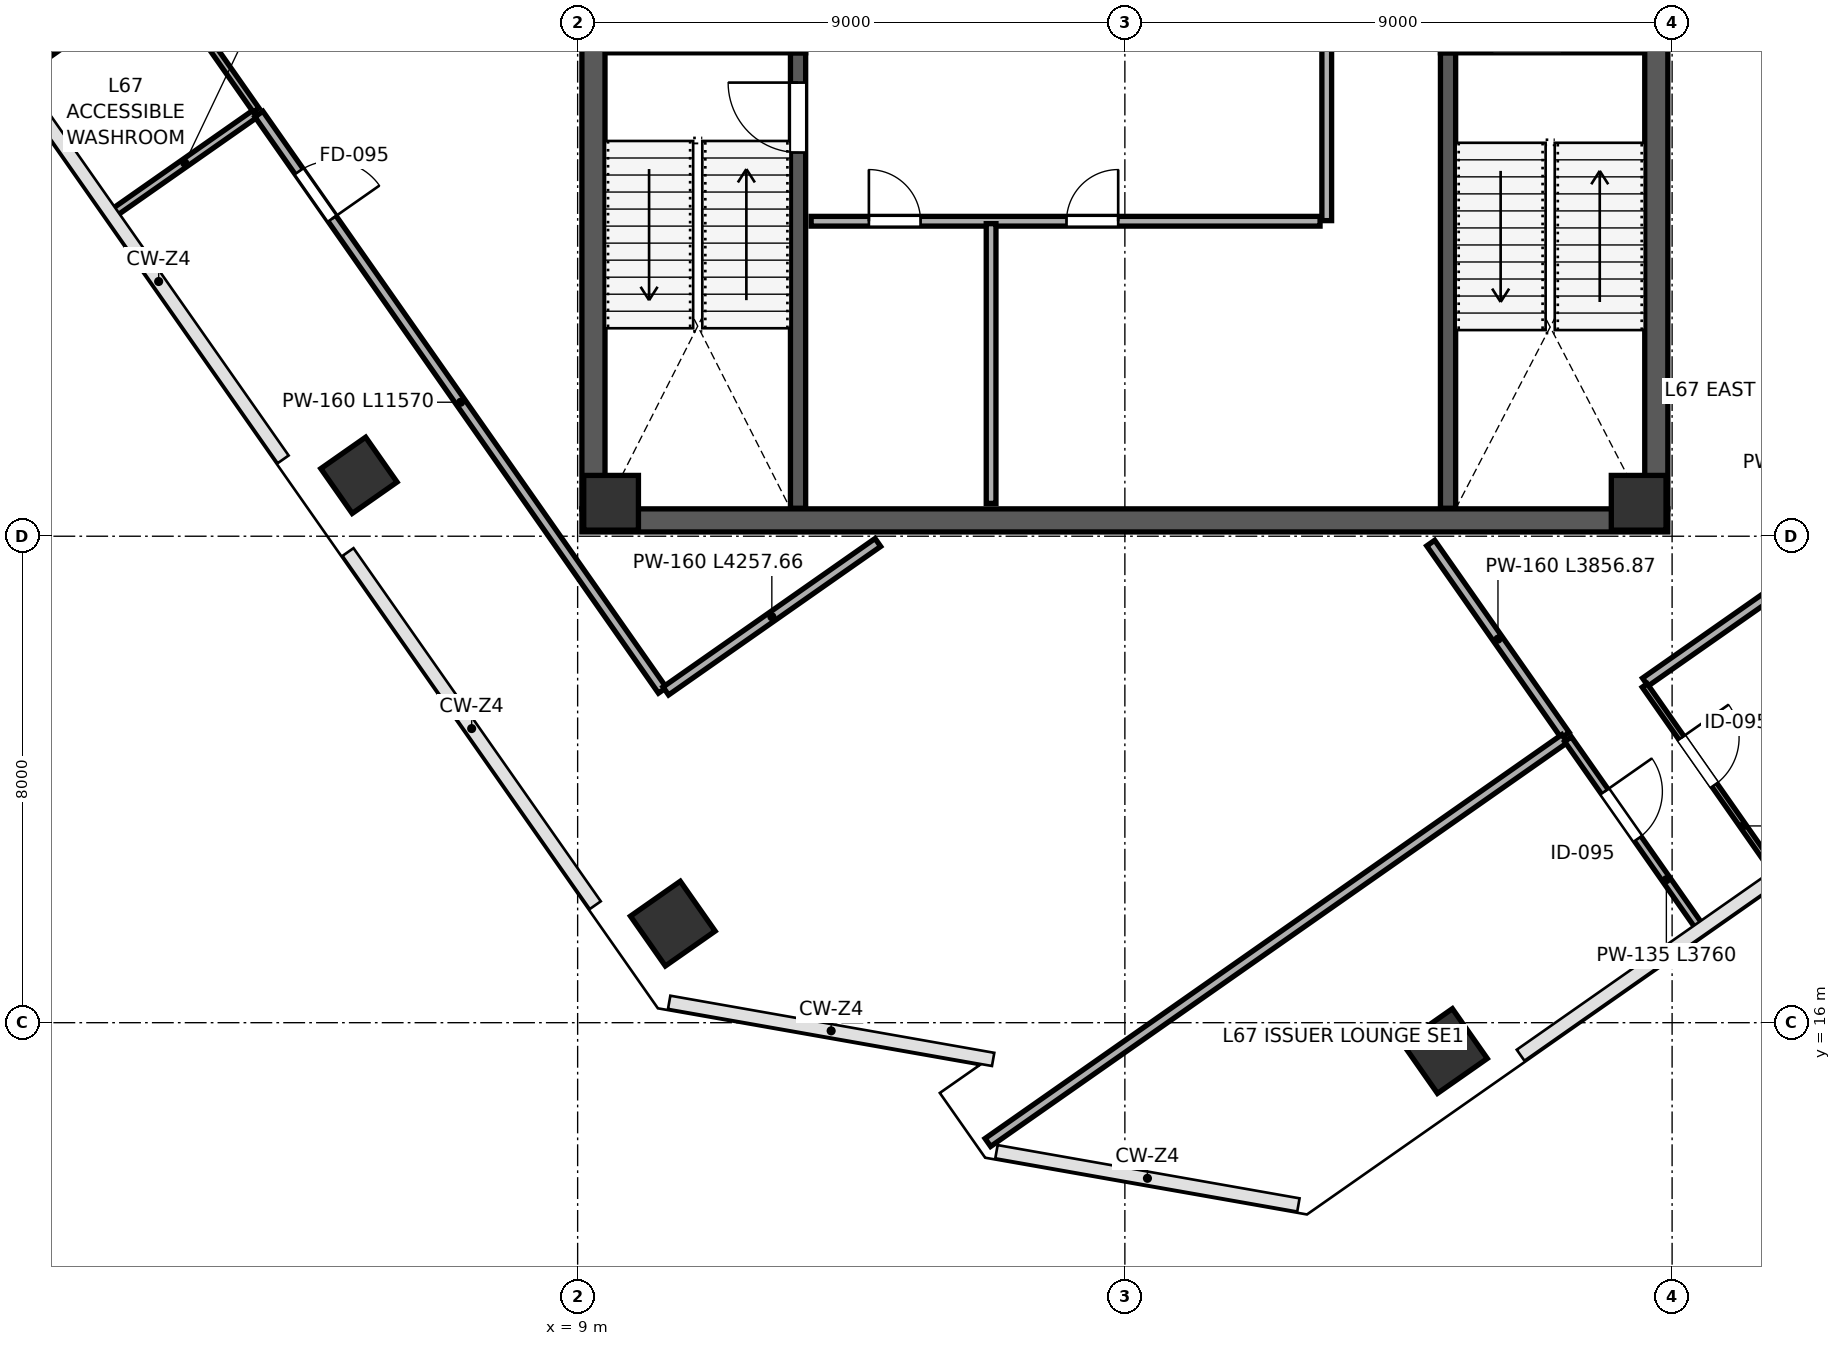
"""IFC4 building model, lengths in metres.
Left out: names, types, materials, properties, quantities, classifications, styles, units other than length and angle.
Written with IfcOpenShell. Run it as: python <this file> out.ifc"""

import sys

from ifc_helpers import new_model, si_unit, direction, frame, frame_2d, origin, origin_2d, place, context, subcontext, project, spatial, rectangle, extrude, source, transform, mapped, element, fill, save


model = new_model("IFC4")
c1 = context("Model", 3, precision=1e-05, world=origin(), true_north=direction((0.0, 1.0)))
c2 = subcontext(c1, "Body", "Model", "MODEL_VIEW")
j1 = project(units=[si_unit("LENGTHUNIT", "METRE"), si_unit("PLANEANGLEUNIT", "RADIAN")], contexts=[c1])
p1 = place(None, origin())
s1 = spatial("IfcSite", under=j1, at=p1, CompositionType="ELEMENT")
p2 = place(p1, origin())
s2 = spatial("IfcBuilding", under=s1, at=p2, CompositionType="ELEMENT")
p3 = place(p2, frame((0.0, 0.0, 298.8)))
s3 = spatial("IfcBuildingStorey", under=s2, at=p3, CompositionType="ELEMENT", Elevation=298.8)
m1 = source(origin(), c2, "Body", "SweptSolid", [
    extrude(rectangle(XDim=0.9, YDim=0.9, at=origin_2d()), origin(), (0.0, 0.0, 1.0), 4.198),
])
for number, where, z_axis, x_axis in (
    (1, (9.55, 24.55, 0.001), (0.0, 0.0, 1.0), (1.0, 0.0, 0.0)),
    (2, (26.45, 24.55, 0.001), (0.0, 0.0, 1.0), (1.0, 0.0, 0.0)),
):
    element("IfcColumn", number, at=place(p3, frame(where, z_axis=z_axis, x_axis=x_axis)), inside=s3, PredefinedType="COLUMN", context=c2, shape_type="MappedRepresentation", body=[
        mapped(m1, transform((0.0, 0.0, 0.0), scale=1.0)),
    ])
m2 = source(origin(), c2, "Body", "SweptSolid", [
    extrude(rectangle(XDim=0.9, YDim=0.9, at=origin_2d()), origin(), (0.0, 0.0, 1.0), 4.198),
])
for number, where, z_axis, x_axis in (
    (3, (0.241, 32.374, 0.001), (0.0, 0.0, 1.0), (-0.574, 0.819, 0.0)),
    (4, (5.403, 25.001, 0.001), (0.0, 0.0, 1.0), (-0.574, 0.819, 0.0)),
):
    element("IfcColumn", number, at=place(p3, frame(where, z_axis=z_axis, x_axis=x_axis)), inside=s3, PredefinedType="COLUMN", context=c2, shape_type="MappedRepresentation", body=[
        mapped(m2, transform((0.0, 0.0, 0.0), scale=1.0)),
    ])
m3 = source(origin(), c2, "Body", "SweptSolid", [
    extrude(rectangle(XDim=1.0, YDim=1.0, at=origin_2d()), origin(), (0.0, 0.0, 1.0), 4.198),
])
for number, where, z_axis, x_axis in (
    (5, (10.565, 17.629, 0.001), (0.0, 0.0, 1.0), (-0.574, 0.819, 0.0)),
    (6, (23.264, 15.534, 0.001), (0.0, 0.0, 1.0), (-0.574, 0.819, 0.0)),
):
    element("IfcColumn", number, at=place(p3, frame(where, z_axis=z_axis, x_axis=x_axis)), inside=s3, PredefinedType="COLUMN", context=c2, shape_type="MappedRepresentation", body=[
        mapped(m3, transform((0.0, 0.0, 0.0), scale=1.0)),
    ])
p4 = place(p3, frame((9.26, 24.45, 0.0), z_axis=(0.0, 0.0, 1.0), x_axis=(0.0, 1.0, 0.0)))
e7 = element("IfcWall", 7, at=p4, inside=s3, PredefinedType="SHEAR", context=c2, shape_type="SweptSolid", body=[
    extrude(rectangle(XDim=15.1, YDim=0.38, at=frame_2d((7.55, 0.0))), origin(), (0.0, 0.0, 1.0), 3.96),
])
p5 = place(p4, frame((8.7, 0.0, 0.0)))
e8 = element("IfcOpeningElement", 8, at=p5, cuts=e7, PredefinedType="OPENING", context=c2, shape_type="SweptSolid", body=[
    extrude(rectangle(XDim=1.15, YDim=2.2, at=frame_2d((0.575, 1.1))), frame((0.0, 0.2, 0.0), z_axis=(0.0, -1.0, 0.0), x_axis=(1.0, 0.0, 0.0)), (0.0, 0.0, 1.0), 0.4),
])
p6 = place(p3, frame((26.74, 24.45, 0.0), z_axis=(0.0, 0.0, 1.0), x_axis=(0.0, 1.0, 0.0)))
e9 = element("IfcWall", 9, at=p6, inside=s3, PredefinedType="SHEAR", context=c2, shape_type="SweptSolid", body=[
    extrude(rectangle(XDim=15.1, YDim=0.38, at=frame_2d((7.55, 0.0))), origin(), (0.0, 0.0, 1.0), 3.96),
])
p7 = place(p6, frame((8.6, 0.0, 0.0)))
e10 = element("IfcOpeningElement", 10, at=p7, cuts=e9, PredefinedType="OPENING", context=c2, shape_type="SweptSolid", body=[
    extrude(rectangle(XDim=1.15, YDim=2.2, at=frame_2d((0.575, 1.1))), frame((0.0, 0.2, 0.0), z_axis=(0.0, -1.0, 0.0), x_axis=(1.0, 0.0, 0.0)), (0.0, 0.0, 1.0), 0.4),
])
p8 = place(p3, frame((9.07, 24.26, 0.0), z_axis=(0.0, 0.0, 1.0), x_axis=(1.0, 0.0, 0.0)))
e11 = element("IfcWall", 11, at=p8, inside=s3, PredefinedType="SHEAR", context=c2, shape_type="SweptSolid", body=[
    extrude(rectangle(XDim=17.86, YDim=0.38, at=frame_2d((8.93, 0.0))), origin(), (0.0, 0.0, 1.0), 3.96),
])
p9 = place(p3, frame((12.625, 24.46, 0.0), z_axis=(0.0, 0.0, 1.0), x_axis=(0.0, 1.0, 0.0)))
e12 = element("IfcWall", 12, at=p9, inside=s3, PredefinedType="SHEAR", context=c2, shape_type="SweptSolid", body=[
    extrude(rectangle(XDim=7.49, YDim=0.25, at=frame_2d((3.745, 0.0))), origin(), (0.0, 0.0, 1.0), 3.96),
])
p10 = place(p9, frame((5.85, 0.0, 0.0)))
e13 = element("IfcOpeningElement", 13, at=p10, cuts=e12, PredefinedType="OPENING", context=c2, shape_type="SweptSolid", body=[
    extrude(rectangle(XDim=1.15, YDim=2.2, at=frame_2d((0.575, 1.1))), frame((0.0, 0.135, 0.0), z_axis=(0.0, -1.0, 0.0), x_axis=(1.0, 0.0, 0.0)), (0.0, 0.0, 1.0), 0.27),
])
p11 = place(p3, frame((9.46, 32.075, 0.0), z_axis=(0.0, 0.0, 1.0), x_axis=(1.0, 0.0, 0.0)))
e14 = element("IfcWall", 14, at=p11, inside=s3, PredefinedType="SHEAR", context=c2, shape_type="SweptSolid", body=[
    extrude(rectangle(XDim=3.29, YDim=0.25, at=frame_2d((1.645, 0.0))), origin(), (0.0, 0.0, 1.0), 3.96),
])
p12 = place(p3, frame((23.315, 24.46, 0.0), z_axis=(0.0, 0.0, 1.0), x_axis=(0.0, 1.0, 0.0)))
e15 = element("IfcWall", 15, at=p12, inside=s3, PredefinedType="SHEAR", context=c2, shape_type="SweptSolid", body=[
    extrude(rectangle(XDim=7.49, YDim=0.25, at=frame_2d((3.745, 0.0))), origin(), (0.0, 0.0, 1.0), 3.96),
])
p13 = place(p3, frame((23.19, 32.075, 0.0), z_axis=(0.0, 0.0, 1.0), x_axis=(1.0, 0.0, 0.0)))
e16 = element("IfcWall", 16, at=p13, inside=s3, PredefinedType="SHEAR", context=c2, shape_type="SweptSolid", body=[
    extrude(rectangle(XDim=3.35, YDim=0.25, at=frame_2d((1.675, 0.0))), origin(), (0.0, 0.0, 1.0), 3.96),
])
p14 = place(p13, frame((0.85, 0.0, 0.0)))
e17 = element("IfcOpeningElement", 17, at=p14, cuts=e16, PredefinedType="OPENING", context=c2, shape_type="SweptSolid", body=[
    extrude(rectangle(XDim=1.15, YDim=2.2, at=frame_2d((0.575, 1.1))), frame((0.0, 0.135, 0.0), z_axis=(0.0, -1.0, 0.0), x_axis=(1.0, 0.0, 0.0)), (0.0, 0.0, 1.0), 0.27),
])
p15 = place(p3, frame((12.84, 29.18, 0.0), z_axis=(0.0, 0.0, 1.0), x_axis=(1.0, 0.0, 0.0)))
e18 = element("IfcWall", 18, at=p15, inside=s3, PredefinedType="PARTITIONING", context=c2, shape_type="SweptSolid", body=[
    extrude(rectangle(XDim=8.37, YDim=0.16, at=frame_2d((4.185, 0.0))), origin(), (0.0, 0.0, 1.0), 3.96),
])
p16 = place(p15, frame((0.95, 0.0, 0.0)))
e19 = element("IfcOpeningElement", 19, at=p16, cuts=e18, PredefinedType="OPENING", context=c2, shape_type="SweptSolid", body=[
    extrude(rectangle(XDim=0.85, YDim=2.1, at=frame_2d((0.425, 1.05))), frame((0.0, 0.09, 0.0), z_axis=(0.0, -1.0, 0.0), x_axis=(1.0, 0.0, 0.0)), (0.0, 0.0, 1.0), 0.18),
])
p17 = place(p15, frame((4.2, 0.0, 0.0)))
e20 = element("IfcOpeningElement", 20, at=p17, cuts=e18, PredefinedType="OPENING", context=c2, shape_type="SweptSolid", body=[
    extrude(rectangle(XDim=0.85, YDim=2.1, at=frame_2d((0.425, 1.05))), frame((0.0, 0.09, 0.0), z_axis=(0.0, -1.0, 0.0), x_axis=(1.0, 0.0, 0.0)), (0.0, 0.0, 1.0), 0.18),
])
p18 = place(p3, frame((15.8, 24.54, 0.0), z_axis=(0.0, 0.0, 1.0), x_axis=(0.0, 1.0, 0.0)))
e21 = element("IfcWall", 21, at=p18, inside=s3, PredefinedType="PARTITIONING", context=c2, shape_type="SweptSolid", body=[
    extrude(rectangle(XDim=4.6, YDim=0.16, at=frame_2d((2.3, 0.0))), origin(), (0.0, 0.0, 1.0), 3.96),
])
p19 = place(p3, frame((21.32, 29.19, 0.0), z_axis=(0.0, 0.0, 1.0), x_axis=(0.0, 1.0, 0.0)))
e22 = element("IfcWall", 22, at=p19, inside=s3, PredefinedType="PARTITIONING", context=c2, shape_type="SweptSolid", body=[
    extrude(rectangle(XDim=2.92, YDim=0.16, at=frame_2d((1.46, 0.0))), origin(), (0.0, 0.0, 1.0), 3.96),
])
p20 = place(p3, frame((-0.431, 31.904, 0.0), z_axis=(0.0, 0.0, 1.0), x_axis=(0.819122867865, 0.573618102347, 0.0)))
e23 = element("IfcWall", 23, at=p20, inside=s3, PredefinedType="PARTITIONING", context=c2, shape_type="SweptSolid", body=[
    extrude(rectangle(XDim=2.84, YDim=0.1, at=frame_2d((1.42, 0.0))), origin(), (0.0, 0.0, 1.0), 3.295),
])
p21 = place(p3, frame((1.376, 29.323, 0.0), z_axis=(0.0, 0.0, 1.0), x_axis=(0.819163257805, 0.573560421458, 0.0)))
e24 = element("IfcWall", 24, at=p21, inside=s3, PredefinedType="PARTITIONING", context=c2, shape_type="SweptSolid", body=[
    extrude(rectangle(XDim=2.84, YDim=0.135, at=frame_2d((1.42, 0.0))), origin(), (0.0, 0.0, 1.0), 3.295),
])
p22 = place(p3, frame((-0.544, 37.086, 0.0), z_axis=(0.0, 0.0, 1.0), x_axis=(0.573568336404, -0.819157715873, 0.0)))
e25 = element("IfcWall", 25, at=p22, inside=s3, PredefinedType="PARTITIONING", context=c2, shape_type="SweptSolid", body=[
    extrude(rectangle(XDim=7.42, YDim=0.115, at=frame_2d((3.71, 0.0))), origin(), (0.0, 0.0, 1.0), 3.96),
])
p23 = place(p22, frame((2.9, 0.0, 0.0)))
e26 = element("IfcOpeningElement", 26, at=p23, cuts=e25, PredefinedType="OPENING", context=c2, shape_type="SweptSolid", body=[
    extrude(rectangle(XDim=0.9, YDim=2.15, at=frame_2d((0.45, 1.075))), frame((0.0, 0.067, 0.0), z_axis=(0.0, -1.0, 0.0), x_axis=(1.0, 0.0, 0.0)), (0.0, 0.0, 1.0), 0.135),
])
p24 = place(p22, frame((5.0, 0.0, 0.0)))
e27 = element("IfcOpeningElement", 27, at=p24, cuts=e25, PredefinedType="OPENING", context=c2, shape_type="SweptSolid", body=[
    extrude(rectangle(XDim=0.95, YDim=2.15, at=frame_2d((0.475, 1.075))), frame((0.0, 0.067, 0.0), z_axis=(0.0, -1.0, 0.0), x_axis=(1.0, 0.0, 0.0)), (0.0, 0.0, 1.0), 0.135),
])
p25 = place(p3, frame((3.758, 30.942, 0.0), z_axis=(0.0, 0.0, 1.0), x_axis=(0.573575634469, -0.819152605772, 0.0)))
e28 = element("IfcWall", 28, at=p25, inside=s3, PredefinedType="PARTITIONING", context=c2, shape_type="SweptSolid", body=[
    extrude(rectangle(XDim=11.57, YDim=0.16, at=frame_2d((5.785, 0.0))), origin(), (0.0, 0.0, 1.0), 3.96),
])
p26 = place(p25, frame((1.15, 0.0, 0.0)))
e29 = element("IfcOpeningElement", 29, at=p26, cuts=e28, PredefinedType="OPENING", context=c2, shape_type="SweptSolid", body=[
    extrude(rectangle(XDim=0.95, YDim=2.15, at=frame_2d((0.475, 1.075))), frame((0.0, 0.09, 0.0), z_axis=(0.0, -1.0, 0.0), x_axis=(1.0, 0.0, 0.0)), (0.0, 0.0, 1.0), 0.18),
])
p27 = place(p3, frame((10.45, 21.455, 0.0), z_axis=(0.0, 0.0, 1.0), x_axis=(0.819110678768, 0.573635507903, 0.0)))
e30 = element("IfcWall", 30, at=p27, inside=s3, PredefinedType="PARTITIONING", context=c2, shape_type="SweptSolid", body=[
    extrude(rectangle(XDim=4.258, YDim=0.16, at=frame_2d((2.129, 0.0))), origin(), (0.0, 0.0, 1.0), 3.96),
])
p28 = place(p3, frame((23.03, 23.887, 0.0), z_axis=(0.0, 0.0, 1.0), x_axis=(0.573602525203, -0.819133776059, 0.0)))
e31 = element("IfcWall", 31, at=p28, inside=s3, PredefinedType="PARTITIONING", context=c2, shape_type="SweptSolid", body=[
    extrude(rectangle(XDim=3.857, YDim=0.16, at=frame_2d((1.928, 0.0))), origin(), (0.0, 0.0, 1.0), 3.96),
])
p29 = place(p3, frame((21.918, 49.884, 0.0), z_axis=(0.0, 0.0, 1.0), x_axis=(0.57358495776, -0.819146077468, 0.0)))
e32 = element("IfcWall", 32, at=p29, inside=s3, PredefinedType="PARTITIONING", context=c2, shape_type="SweptSolid", body=[
    extrude(rectangle(XDim=25.79, YDim=0.1, at=frame_2d((12.895, 0.0))), origin(), (0.0, 0.0, 1.0), 3.96),
])
p30 = place(p29, frame((9.2, 0.0, 0.0)))
e33 = element("IfcOpeningElement", 33, at=p30, cuts=e32, PredefinedType="OPENING", context=c2, shape_type="SweptSolid", body=[
    extrude(rectangle(XDim=0.95, YDim=2.15, at=frame_2d((0.475, 1.075))), frame((0.0, 0.06, 0.0), z_axis=(0.0, -1.0, 0.0), x_axis=(1.0, 0.0, 0.0)), (0.0, 0.0, 1.0), 0.12),
])
p31 = place(p3, frame((26.559, 21.601, 0.0), z_axis=(0.0, 0.0, 1.0), x_axis=(0.819143682501, 0.573588378036, 0.0)))
e34 = element("IfcWall", 34, at=p31, inside=s3, PredefinedType="PARTITIONING", context=c2, shape_type="SweptSolid", body=[
    extrude(rectangle(XDim=9.49, YDim=0.16, at=frame_2d((4.745, 0.0))), origin(), (0.0, 0.0, 1.0), 3.96),
])
p32 = place(p3, frame((15.747, 14.03, 0.0), z_axis=(0.0, 0.0, 1.0), x_axis=(0.819150694041, 0.573578364701, 0.0)))
e35 = element("IfcWall", 35, at=p32, inside=s3, PredefinedType="PARTITIONING", context=c2, shape_type="SweptSolid", body=[
    extrude(rectangle(XDim=11.58, YDim=0.16, at=frame_2d((5.79, 0.0))), origin(), (0.0, 0.0, 1.0), 3.96),
])
p33 = place(p3, frame((26.55, 21.546, 0.0), z_axis=(0.0, 0.0, 1.0), x_axis=(0.573614860738, -0.8191251379, 0.0)))
e36 = element("IfcWall", 36, at=p33, inside=s3, PredefinedType="PARTITIONING", context=c2, shape_type="SweptSolid", body=[
    extrude(rectangle(XDim=3.76, YDim=0.1, at=frame_2d((1.88, 0.0))), origin(), (0.0, 0.0, 1.0), 3.96),
])
p34 = place(p33, frame((1.05, 0.0, 0.0)))
e37 = element("IfcOpeningElement", 37, at=p34, cuts=e36, PredefinedType="OPENING", context=c2, shape_type="SweptSolid", body=[
    extrude(rectangle(XDim=0.95, YDim=2.15, at=frame_2d((0.475, 1.075))), frame((0.0, 0.06, 0.0), z_axis=(0.0, -1.0, 0.0), x_axis=(1.0, 0.0, 0.0)), (0.0, 0.0, 1.0), 0.12),
])
p35 = place(p3, frame((25.288, 20.662, 0.0), z_axis=(0.0, 0.0, 1.0), x_axis=(0.573614860738, -0.8191251379, 0.0)))
e38 = element("IfcWall", 38, at=p35, inside=s3, PredefinedType="PARTITIONING", context=c2, shape_type="SweptSolid", body=[
    extrude(rectangle(XDim=3.76, YDim=0.135, at=frame_2d((1.88, 0.0))), origin(), (0.0, 0.0, 1.0), 3.96),
])
p36 = place(p35, frame((1.05, 0.0, 0.0)))
e39 = element("IfcOpeningElement", 39, at=p36, cuts=e38, PredefinedType="OPENING", context=c2, shape_type="SweptSolid", body=[
    extrude(rectangle(XDim=0.95, YDim=2.15, at=frame_2d((0.475, 1.075))), frame((0.0, 0.078, 0.0), z_axis=(0.0, -1.0, 0.0), x_axis=(1.0, 0.0, 0.0)), (0.0, 0.0, 1.0), 0.155),
])
m4 = source(origin(), c2, "Body", "SweptSolid", [
    extrude(rectangle(XDim=1.15, YDim=2.2, at=frame_2d((0.575, 1.1))), frame((0.0, 0.025, 0.0), z_axis=(0.0, -1.0, 0.0), x_axis=(1.0, 0.0, 0.0)), (0.0, 0.0, 1.0), 0.05),
])
p37 = place(p10, origin())
e40 = element("IfcDoor", 40, at=p37, inside=s3, OperationType="SINGLE_SWING_RIGHT", PredefinedType="DOOR", context=c2, shape_type="MappedRepresentation", body=[
    mapped(m4, transform((0.0, 0.0, 0.0), scale=1.0)),
])
fill(e13, e40)
m5 = source(origin(), c2, "Body", "SweptSolid", [
    extrude(rectangle(XDim=0.85, YDim=2.1, at=frame_2d((0.425, 1.05))), frame((0.0, 0.025, 0.0), z_axis=(0.0, -1.0, 0.0), x_axis=(1.0, 0.0, 0.0)), (0.0, 0.0, 1.0), 0.05),
])
p38 = place(p16, origin())
e41 = element("IfcDoor", 41, at=p38, inside=s3, OperationType="SINGLE_SWING_LEFT", PredefinedType="DOOR", context=c2, shape_type="MappedRepresentation", body=[
    mapped(m5, transform((0.0, 0.0, 0.0), scale=1.0)),
])
fill(e19, e41)
p39 = place(p17, origin())
e42 = element("IfcDoor", 42, at=p39, inside=s3, OperationType="SINGLE_SWING_RIGHT", PredefinedType="DOOR", context=c2, shape_type="MappedRepresentation", body=[
    mapped(m5, transform((0.0, 0.0, 0.0), scale=1.0)),
])
fill(e20, e42)
m6 = source(origin(), c2, "Body", "SweptSolid", [
    extrude(rectangle(XDim=0.95, YDim=2.15, at=frame_2d((0.475, 1.075))), frame((0.0, 0.025, 0.0), z_axis=(0.0, -1.0, 0.0), x_axis=(1.0, 0.0, 0.0)), (0.0, 0.0, 1.0), 0.05),
])
p40 = place(p26, origin())
e43 = element("IfcDoor", 43, at=p40, inside=s3, OperationType="SINGLE_SWING_RIGHT", PredefinedType="DOOR", context=c2, shape_type="MappedRepresentation", body=[
    mapped(m6, transform((0.0, 0.0, 0.0), scale=1.0)),
])
fill(e29, e43)
m7 = source(origin(), c2, "Body", "SweptSolid", [
    extrude(rectangle(XDim=0.95, YDim=2.15, at=frame_2d((0.475, 1.075))), frame((0.0, 0.025, 0.0), z_axis=(0.0, -1.0, 0.0), x_axis=(1.0, 0.0, 0.0)), (0.0, 0.0, 1.0), 0.05),
])
p41 = place(p34, origin())
e44 = element("IfcDoor", 44, at=p41, inside=s3, OperationType="SINGLE_SWING_LEFT", PredefinedType="DOOR", context=c2, shape_type="MappedRepresentation", body=[
    mapped(m7, transform((0.0, 0.0, 0.0), scale=1.0)),
])
fill(e37, e44)
p42 = place(p36, origin())
e45 = element("IfcDoor", 45, at=p42, inside=s3, OperationType="SINGLE_SWING_LEFT", PredefinedType="DOOR", context=c2, shape_type="MappedRepresentation", body=[
    mapped(m7, transform((0.0, 0.0, 0.0), scale=1.0)),
])
fill(e39, e45)
save(model, sys.argv[1])
